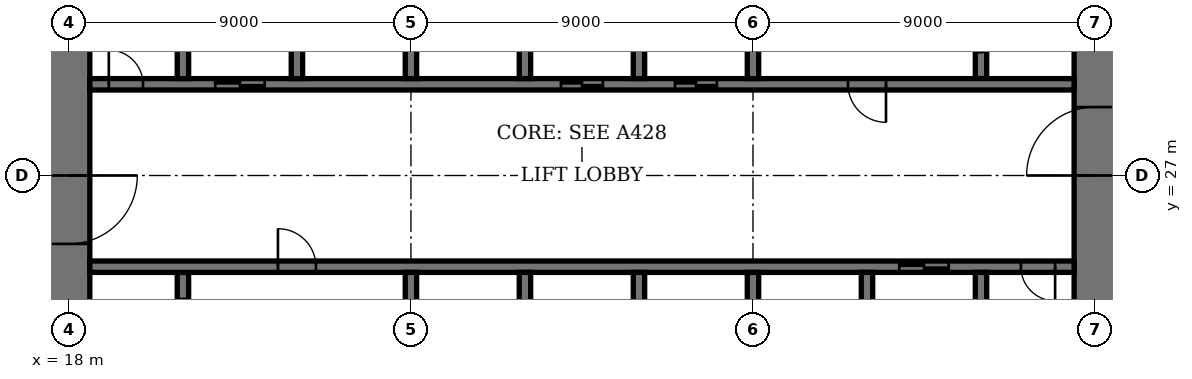
"""IFC4 building model, lengths in metres.
Left out: names, types, materials, properties, quantities, classifications, styles, units other than length and angle.
Written with IfcOpenShell. Run it as: python <this file> out.ifc"""

import sys

from ifc_helpers import new_model, si_unit, direction, frame, frame_2d, origin, place, context, subcontext, project, spatial, rectangle, extrude, element, fill, save


model = new_model("IFC4")
c1 = context("Model", 3, precision=1e-05, world=origin(), true_north=direction((0.0, 1.0)))
c2 = subcontext(c1, "Body", "Model", "MODEL_VIEW")
j1 = project(units=[si_unit("LENGTHUNIT", "METRE"), si_unit("PLANEANGLEUNIT", "RADIAN")], contexts=[c1])
p1 = place(None, origin())
s1 = spatial("IfcSite", under=j1, at=p1, CompositionType="ELEMENT")
p2 = place(p1, origin())
s2 = spatial("IfcBuilding", under=s1, at=p2, CompositionType="ELEMENT")
p3 = place(p2, frame((0.0, 0.0, 153.0)))
s3 = spatial("IfcBuildingStorey", under=s2, at=p3, CompositionType="ELEMENT", Elevation=153.0)
p4 = place(p3, frame((18.0, 35.45, 0.0), z_axis=(0.0, 0.0, 1.0), x_axis=(0.0, -1.0, 0.0)))
e1 = element("IfcWall", 1, at=p4, inside=s3, PredefinedType="SHEAR", context=c2, shape_type="SweptSolid", body=[
    extrude(rectangle(XDim=16.9, YDim=1.1, at=frame_2d((8.45, 0.0))), origin(), (0.0, 0.0, 1.0), 4.2),
])
p5 = place(p4, frame((8.45, 0.0, 0.0)))
e2 = element("IfcOpeningElement", 2, at=p5, cuts=e1, PredefinedType="OPENING", context=c2, shape_type="SweptSolid", body=[
    extrude(rectangle(XDim=1.8, YDim=2.4, at=frame_2d((0.9, 1.2))), frame((0.0, 0.56, 0.0), z_axis=(0.0, -1.0, 0.0), x_axis=(1.0, 0.0, 0.0)), (0.0, 0.0, 1.0), 1.12),
])
p6 = place(p3, frame((45.0, 18.55, 0.0), z_axis=(0.0, 0.0, 1.0), x_axis=(0.0, 1.0, 0.0)))
e3 = element("IfcWall", 3, at=p6, inside=s3, PredefinedType="SHEAR", context=c2, shape_type="SweptSolid", body=[
    extrude(rectangle(XDim=16.9, YDim=1.1, at=frame_2d((8.45, 0.0))), origin(), (0.0, 0.0, 1.0), 4.2),
])
p7 = place(p6, frame((8.45, 0.0, 0.0)))
e4 = element("IfcOpeningElement", 4, at=p7, cuts=e3, PredefinedType="OPENING", context=c2, shape_type="SweptSolid", body=[
    extrude(rectangle(XDim=1.8, YDim=2.4, at=frame_2d((0.9, 1.2))), frame((0.0, 0.56, 0.0), z_axis=(0.0, -1.0, 0.0), x_axis=(1.0, 0.0, 0.0)), (0.0, 0.0, 1.0), 1.12),
])
p8 = place(p3, frame((21.0, 21.95, 0.0), z_axis=(0.0, 0.0, 1.0), x_axis=(0.0, 1.0, 0.0)))
e5 = element("IfcWall", 5, at=p8, inside=s3, PredefinedType="SHEAR", context=c2, shape_type="SweptSolid", body=[
    extrude(rectangle(XDim=2.5, YDim=0.3, at=frame_2d((1.25, 0.0))), origin(), (0.0, 0.0, 1.0), 4.2),
])
p9 = place(p8, frame((0.7, 0.0, 0.0)))
e6 = element("IfcOpeningElement", 6, at=p9, cuts=e5, PredefinedType="OPENING", context=c2, shape_type="SweptSolid", body=[
    extrude(rectangle(XDim=1.1, YDim=2.4, at=frame_2d((0.55, 1.2))), frame((0.0, 0.16, 0.0), z_axis=(0.0, -1.0, 0.0), x_axis=(1.0, 0.0, 0.0)), (0.0, 0.0, 1.0), 0.32),
])
p10 = place(p3, frame((42.0, 29.55, 0.0), z_axis=(0.0, 0.0, 1.0), x_axis=(0.0, 1.0, 0.0)))
e7 = element("IfcWall", 7, at=p10, inside=s3, PredefinedType="SHEAR", context=c2, shape_type="SweptSolid", body=[
    extrude(rectangle(XDim=2.5, YDim=0.3, at=frame_2d((1.25, 0.0))), origin(), (0.0, 0.0, 1.0), 4.2),
])
p11 = place(p10, frame((0.7, 0.0, 0.0)))
e8 = element("IfcOpeningElement", 8, at=p11, cuts=e7, PredefinedType="OPENING", context=c2, shape_type="SweptSolid", body=[
    extrude(rectangle(XDim=1.1, YDim=2.4, at=frame_2d((0.55, 1.2))), frame((0.0, 0.16, 0.0), z_axis=(0.0, -1.0, 0.0), x_axis=(1.0, 0.0, 0.0)), (0.0, 0.0, 1.0), 0.32),
])
p12 = place(p3, frame((18.55, 24.6, 0.0), z_axis=(0.0, 0.0, 1.0), x_axis=(1.0, 0.0, 0.0)))
e9 = element("IfcWall", 9, at=p12, inside=s3, PredefinedType="SHEAR", context=c2, shape_type="SweptSolid", body=[
    extrude(rectangle(XDim=25.9, YDim=0.3, at=frame_2d((12.95, 0.0))), origin(), (0.0, 0.0, 1.0), 4.2),
])
p13 = place(p12, frame((4.95, 0.0, 0.0)))
e10 = element("IfcOpeningElement", 10, at=p13, cuts=e9, PredefinedType="OPENING", context=c2, shape_type="SweptSolid", body=[
    extrude(rectangle(XDim=1.0, YDim=2.4, at=frame_2d((0.5, 1.2))), frame((0.0, 0.16, 0.0), z_axis=(0.0, -1.0, 0.0), x_axis=(1.0, 0.0, 0.0)), (0.0, 0.0, 1.0), 0.32),
])
p14 = place(p12, frame((24.5, 0.0, 0.0)))
e11 = element("IfcOpeningElement", 11, at=p14, cuts=e9, PredefinedType="OPENING", context=c2, shape_type="SweptSolid", body=[
    extrude(rectangle(XDim=0.9, YDim=2.1, at=frame_2d((0.45, 1.05))), frame((0.0, 0.16, 0.0), z_axis=(0.0, -1.0, 0.0), x_axis=(1.0, 0.0, 0.0)), (0.0, 0.0, 1.0), 0.32),
])
p15 = place(p12, frame((21.3, 0.0, 0.0)))
e12 = element("IfcOpeningElement", 12, at=p15, cuts=e9, PredefinedType="OPENING", context=c2, shape_type="SweptSolid", body=[
    extrude(rectangle(XDim=1.3, YDim=2.4, at=frame_2d((0.65, 1.2))), frame((0.0, 0.16, 0.0), z_axis=(0.0, -1.0, 0.0), x_axis=(1.0, 0.0, 0.0)), (0.0, 0.0, 1.0), 0.32),
])
p16 = place(p3, frame((18.55, 29.4, 0.0), z_axis=(0.0, 0.0, 1.0), x_axis=(1.0, 0.0, 0.0)))
e13 = element("IfcWall", 13, at=p16, inside=s3, PredefinedType="SHEAR", context=c2, shape_type="SweptSolid", body=[
    extrude(rectangle(XDim=25.9, YDim=0.3, at=frame_2d((12.95, 0.0))), origin(), (0.0, 0.0, 1.0), 4.2),
])
p17 = place(p16, frame((19.95, 0.0, 0.0)))
e14 = element("IfcOpeningElement", 14, at=p17, cuts=e13, PredefinedType="OPENING", context=c2, shape_type="SweptSolid", body=[
    extrude(rectangle(XDim=1.0, YDim=2.4, at=frame_2d((0.5, 1.2))), frame((0.0, 0.16, 0.0), z_axis=(0.0, -1.0, 0.0), x_axis=(1.0, 0.0, 0.0)), (0.0, 0.0, 1.0), 0.32),
])
p18 = place(p16, frame((0.5, 0.0, 0.0)))
e15 = element("IfcOpeningElement", 15, at=p18, cuts=e13, PredefinedType="OPENING", context=c2, shape_type="SweptSolid", body=[
    extrude(rectangle(XDim=0.9, YDim=2.1, at=frame_2d((0.45, 1.05))), frame((0.0, 0.16, 0.0), z_axis=(0.0, -1.0, 0.0), x_axis=(1.0, 0.0, 0.0)), (0.0, 0.0, 1.0), 0.32),
])
p19 = place(p16, frame((15.4, 0.0, 0.0)))
e16 = element("IfcOpeningElement", 16, at=p19, cuts=e13, PredefinedType="OPENING", context=c2, shape_type="SweptSolid", body=[
    extrude(rectangle(XDim=1.1, YDim=2.4, at=frame_2d((0.55, 1.2))), frame((0.0, 0.16, 0.0), z_axis=(0.0, -1.0, 0.0), x_axis=(1.0, 0.0, 0.0)), (0.0, 0.0, 1.0), 0.32),
])
p20 = place(p16, frame((12.4, 0.0, 0.0)))
e17 = element("IfcOpeningElement", 17, at=p20, cuts=e13, PredefinedType="OPENING", context=c2, shape_type="SweptSolid", body=[
    extrude(rectangle(XDim=1.1, YDim=2.4, at=frame_2d((0.55, 1.2))), frame((0.0, 0.16, 0.0), z_axis=(0.0, -1.0, 0.0), x_axis=(1.0, 0.0, 0.0)), (0.0, 0.0, 1.0), 0.32),
])
p21 = place(p16, frame((3.3, 0.0, 0.0)))
e18 = element("IfcOpeningElement", 18, at=p21, cuts=e13, PredefinedType="OPENING", context=c2, shape_type="SweptSolid", body=[
    extrude(rectangle(XDim=1.3, YDim=2.4, at=frame_2d((0.65, 1.2))), frame((0.0, 0.16, 0.0), z_axis=(0.0, -1.0, 0.0), x_axis=(1.0, 0.0, 0.0)), (0.0, 0.0, 1.0), 0.32),
])
for number, where, z_axis, x_axis in (
    (19, (30.0, 21.75, 0.0), (0.0, 0.0, 1.0), (0.0, 1.0, 0.0)),
    (20, (33.0, 29.55, 0.0), (0.0, 0.0, 1.0), (0.0, 1.0, 0.0)),
    (21, (33.0, 21.75, 0.0), (0.0, 0.0, 1.0), (0.0, 1.0, 0.0)),
    (22, (30.0, 29.55, 0.0), (0.0, 0.0, 1.0), (0.0, 1.0, 0.0)),
    (23, (36.0, 21.75, 0.0), (0.0, 0.0, 1.0), (0.0, 1.0, 0.0)),
    (24, (27.0, 29.55, 0.0), (0.0, 0.0, 1.0), (0.0, 1.0, 0.0)),
):
    element("IfcWall", number, at=place(p3, frame(where, z_axis=z_axis, x_axis=x_axis)), inside=s3, PredefinedType="SHEAR", context=c2, shape_type="SweptSolid", body=[
        extrude(rectangle(XDim=2.7, YDim=0.3, at=frame_2d((1.35, 0.0))), origin(), (0.0, 0.0, 1.0), 4.2),
    ])
for number, where, z_axis, x_axis in (
    (25, (39.0, 18.55, 0.0), (0.0, 0.0, 1.0), (0.0, 1.0, 0.0)),
    (26, (24.0, 29.55, 0.0), (0.0, 0.0, 1.0), (0.0, 1.0, 0.0)),
):
    element("IfcWall", number, at=place(p3, frame(where, z_axis=z_axis, x_axis=x_axis)), inside=s3, PredefinedType="SHEAR", context=c2, shape_type="SweptSolid", body=[
        extrude(rectangle(XDim=5.9, YDim=0.3, at=frame_2d((2.95, 0.0))), origin(), (0.0, 0.0, 1.0), 4.2),
    ])
for number, where, z_axis, x_axis in (
    (27, (42.0, 21.75, 0.0), (0.0, 0.0, 1.0), (0.0, 1.0, 0.0)),
    (28, (21.0, 29.55, 0.0), (0.0, 0.0, 1.0), (0.0, 1.0, 0.0)),
):
    element("IfcWall", number, at=place(p3, frame(where, z_axis=z_axis, x_axis=x_axis)), inside=s3, PredefinedType="SHEAR", context=c2, shape_type="SweptSolid", body=[
        extrude(rectangle(XDim=2.7, YDim=0.3, at=frame_2d((1.35, 0.0))), origin(), (0.0, 0.0, 1.0), 4.2),
    ])
for number, where, z_axis, x_axis in (
    (29, (27.0, 21.6, 0.0), (0.0, 0.0, 1.0), (0.0, 1.0, 0.0)),
    (30, (36.0, 29.55, 0.0), (0.0, 0.0, 1.0), (0.0, 1.0, 0.0)),
):
    element("IfcWall", number, at=place(p3, frame(where, z_axis=z_axis, x_axis=x_axis)), inside=s3, PredefinedType="SHEAR", context=c2, shape_type="SweptSolid", body=[
        extrude(rectangle(XDim=2.85, YDim=0.3, at=frame_2d((1.425, 0.0))), origin(), (0.0, 0.0, 1.0), 4.2),
    ])
p22 = place(p5, origin())
e31 = element("IfcDoor", 31, at=p22, inside=s3, OperationType="DOUBLE_DOOR_DOUBLE_SWING", PredefinedType="DOOR", context=c2, shape_type="SweptSolid", body=[
    extrude(rectangle(XDim=1.8, YDim=2.4, at=frame_2d((0.9, 1.2))), frame((0.0, 0.03, 0.0), z_axis=(0.0, -1.0, 0.0), x_axis=(1.0, 0.0, 0.0)), (0.0, 0.0, 1.0), 0.06),
    extrude(rectangle(XDim=0.04, YDim=2.4, at=frame_2d((0.02, 1.2))), frame((0.0, 0.55, 0.0), z_axis=(0.0, -1.0, 0.0), x_axis=(1.0, 0.0, 0.0)), (0.0, 0.0, 1.0), 1.1),
    extrude(rectangle(XDim=0.04, YDim=2.4, at=frame_2d((1.78, 1.2))), frame((0.0, 0.55, 0.0), z_axis=(0.0, -1.0, 0.0), x_axis=(1.0, 0.0, 0.0)), (0.0, 0.0, 1.0), 1.1),
    extrude(rectangle(XDim=1.8, YDim=0.04, at=frame_2d((0.9, 2.38))), frame((0.0, 0.55, 0.0), z_axis=(0.0, -1.0, 0.0), x_axis=(1.0, 0.0, 0.0)), (0.0, 0.0, 1.0), 1.1),
])
fill(e2, e31)
p23 = place(p7, origin())
e32 = element("IfcDoor", 32, at=p23, inside=s3, OperationType="DOUBLE_DOOR_DOUBLE_SWING", PredefinedType="DOOR", context=c2, shape_type="SweptSolid", body=[
    extrude(rectangle(XDim=1.8, YDim=2.4, at=frame_2d((0.9, 1.2))), frame((0.0, 0.03, 0.0), z_axis=(0.0, -1.0, 0.0), x_axis=(1.0, 0.0, 0.0)), (0.0, 0.0, 1.0), 0.06),
    extrude(rectangle(XDim=0.04, YDim=2.4, at=frame_2d((0.02, 1.2))), frame((0.0, 0.55, 0.0), z_axis=(0.0, -1.0, 0.0), x_axis=(1.0, 0.0, 0.0)), (0.0, 0.0, 1.0), 1.1),
    extrude(rectangle(XDim=0.04, YDim=2.4, at=frame_2d((1.78, 1.2))), frame((0.0, 0.55, 0.0), z_axis=(0.0, -1.0, 0.0), x_axis=(1.0, 0.0, 0.0)), (0.0, 0.0, 1.0), 1.1),
    extrude(rectangle(XDim=1.8, YDim=0.04, at=frame_2d((0.9, 2.38))), frame((0.0, 0.55, 0.0), z_axis=(0.0, -1.0, 0.0), x_axis=(1.0, 0.0, 0.0)), (0.0, 0.0, 1.0), 1.1),
])
fill(e4, e32)
p24 = place(p13, origin())
e33 = element("IfcDoor", 33, at=p24, inside=s3, OperationType="SINGLE_SWING_RIGHT", PredefinedType="DOOR", context=c2, shape_type="SweptSolid", body=[
    extrude(rectangle(XDim=1.0, YDim=2.4, at=frame_2d((0.5, 1.2))), frame((0.0, 0.03, 0.0), z_axis=(0.0, -1.0, 0.0), x_axis=(1.0, 0.0, 0.0)), (0.0, 0.0, 1.0), 0.06),
])
fill(e10, e33)
p25 = place(p17, origin())
e34 = element("IfcDoor", 34, at=p25, inside=s3, OperationType="SINGLE_SWING_RIGHT", PredefinedType="DOOR", context=c2, shape_type="SweptSolid", body=[
    extrude(rectangle(XDim=1.0, YDim=2.4, at=frame_2d((0.5, 1.2))), frame((0.0, 0.03, 0.0), z_axis=(0.0, -1.0, 0.0), x_axis=(1.0, 0.0, 0.0)), (0.0, 0.0, 1.0), 0.06),
])
fill(e14, e34)
p26 = place(p14, origin())
e35 = element("IfcDoor", 35, at=p26, inside=s3, OperationType="SINGLE_SWING_RIGHT", PredefinedType="DOOR", context=c2, shape_type="SweptSolid", body=[
    extrude(rectangle(XDim=0.9, YDim=2.1, at=frame_2d((0.45, 1.05))), frame((0.0, 0.03, 0.0), z_axis=(0.0, -1.0, 0.0), x_axis=(1.0, 0.0, 0.0)), (0.0, 0.0, 1.0), 0.06),
])
fill(e11, e35)
p27 = place(p18, origin())
e36 = element("IfcDoor", 36, at=p27, inside=s3, OperationType="SINGLE_SWING_RIGHT", PredefinedType="DOOR", context=c2, shape_type="SweptSolid", body=[
    extrude(rectangle(XDim=0.9, YDim=2.1, at=frame_2d((0.45, 1.05))), frame((0.0, 0.03, 0.0), z_axis=(0.0, -1.0, 0.0), x_axis=(1.0, 0.0, 0.0)), (0.0, 0.0, 1.0), 0.06),
])
fill(e15, e36)
p28 = place(p19, origin())
e37 = element("IfcDoor", 37, at=p28, inside=s3, OperationType="DOUBLE_DOOR_SLIDING", PredefinedType="DOOR", context=c2, shape_type="SweptSolid", body=[
    extrude(rectangle(XDim=1.1, YDim=2.4, at=frame_2d((0.55, 1.2))), frame((0.0, 0.02, 0.0), z_axis=(0.0, -1.0, 0.0), x_axis=(1.0, 0.0, 0.0)), (0.0, 0.0, 1.0), 0.04),
])
fill(e16, e37)
p29 = place(p20, origin())
e38 = element("IfcDoor", 38, at=p29, inside=s3, OperationType="DOUBLE_DOOR_SLIDING", PredefinedType="DOOR", context=c2, shape_type="SweptSolid", body=[
    extrude(rectangle(XDim=1.1, YDim=2.4, at=frame_2d((0.55, 1.2))), frame((0.0, 0.02, 0.0), z_axis=(0.0, -1.0, 0.0), x_axis=(1.0, 0.0, 0.0)), (0.0, 0.0, 1.0), 0.04),
])
fill(e17, e38)
p30 = place(p15, origin())
e39 = element("IfcDoor", 39, at=p30, inside=s3, OperationType="DOUBLE_DOOR_SLIDING", PredefinedType="DOOR", context=c2, shape_type="SweptSolid", body=[
    extrude(rectangle(XDim=1.3, YDim=2.4, at=frame_2d((0.65, 1.2))), frame((0.0, 0.02, 0.0), z_axis=(0.0, -1.0, 0.0), x_axis=(1.0, 0.0, 0.0)), (0.0, 0.0, 1.0), 0.04),
])
fill(e12, e39)
p31 = place(p21, origin())
e40 = element("IfcDoor", 40, at=p31, inside=s3, OperationType="DOUBLE_DOOR_SLIDING", PredefinedType="DOOR", context=c2, shape_type="SweptSolid", body=[
    extrude(rectangle(XDim=1.3, YDim=2.4, at=frame_2d((0.65, 1.2))), frame((0.0, 0.02, 0.0), z_axis=(0.0, -1.0, 0.0), x_axis=(1.0, 0.0, 0.0)), (0.0, 0.0, 1.0), 0.04),
])
fill(e18, e40)
save(model, sys.argv[1])
